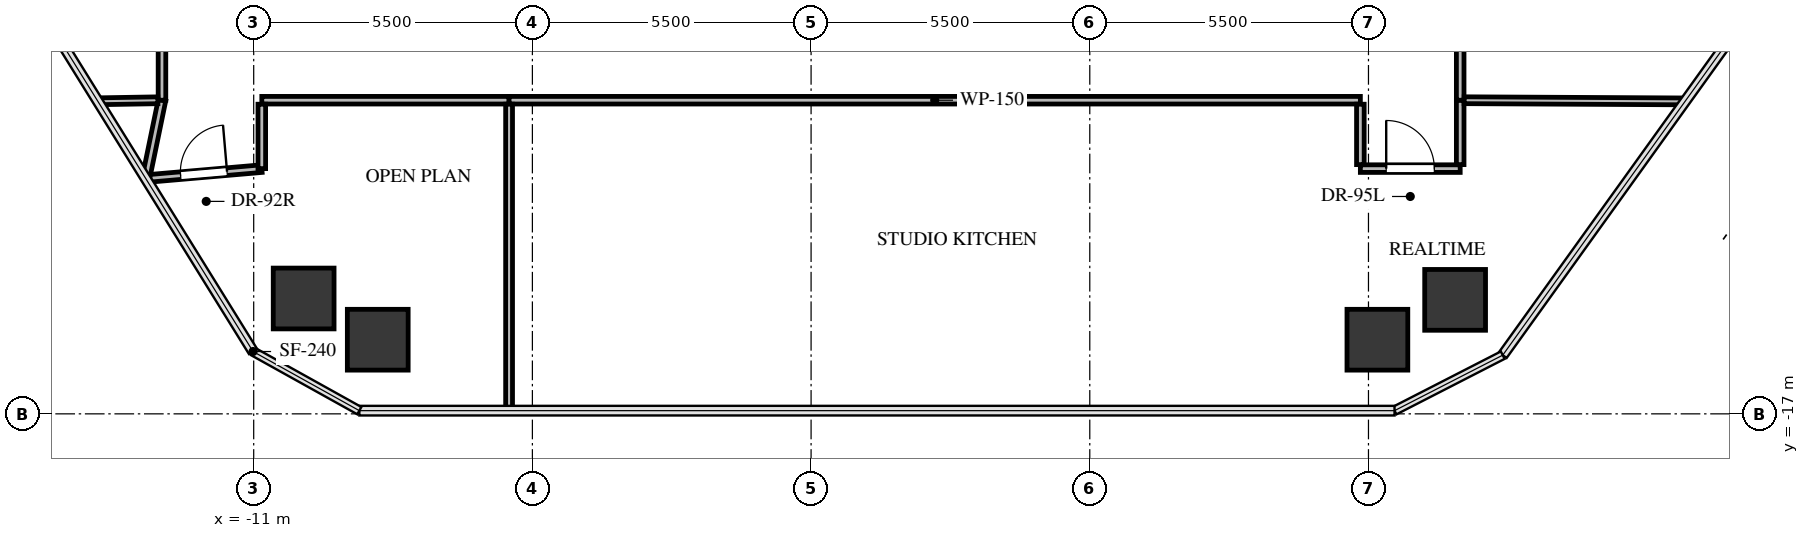
"""IFC4 building model, lengths in metres.
Left out: names, types, materials, properties, quantities, classifications, styles, units other than length and angle.
Written with IfcOpenShell. Run it as: python <this file> out.ifc"""

import sys

from ifc_helpers import new_model, si_unit, direction, frame, frame_2d, origin, origin_2d, place, context, subcontext, project, spatial, rectangle, extrude, source, transform, mapped, element, fill, save


model = new_model("IFC4")
c1 = context("Model", 3, precision=1e-05, world=origin(), true_north=direction((0.0, 1.0)))
c2 = subcontext(c1, "Body", "Model", "MODEL_VIEW")
j1 = project(units=[si_unit("LENGTHUNIT", "METRE"), si_unit("PLANEANGLEUNIT", "RADIAN")], contexts=[c1])
p1 = place(None, origin())
s1 = spatial("IfcSite", under=j1, at=p1, CompositionType="ELEMENT")
p2 = place(p1, origin())
s2 = spatial("IfcBuilding", under=s1, at=p2, CompositionType="ELEMENT")
p3 = place(p2, frame((0.0, 0.0, 133.8)))
s3 = spatial("IfcBuildingStorey", under=s2, at=p3, CompositionType="ELEMENT", Elevation=133.8)
m1 = source(origin(), c2, "Body", "SweptSolid", [
    extrude(rectangle(XDim=1.2, YDim=1.2, at=origin_2d()), origin(), (0.0, 0.0, 1.0), 3.3),
])
for number, where, z_axis, x_axis in (
    (1, (-10.014, -14.723, -0.24), (0.0, 0.0, 1.0), (1.0, 0.0, 0.0)),
    (2, (12.71, -14.75, -0.24), (0.0, 0.0, 1.0), (1.0, 0.0, 0.0)),
    (3, (11.176, -15.537, -0.24), (0.0, 0.0, 1.0), (1.0, 0.0, 0.0)),
    (4, (-8.552, -15.537, -0.24), (0.0, 0.0, 1.0), (1.0, 0.0, 0.0)),
):
    element("IfcColumn", number, at=place(p3, frame(where, z_axis=z_axis, x_axis=x_axis)), inside=s3, PredefinedType="COLUMN", context=c2, shape_type="MappedRepresentation", body=[
        mapped(m1, transform((0.0, 0.0, 0.0), x_axis=(1.0, 0.0, 0.0), y_axis=(0.0, 1.0, 0.0), z_axis=(0.0, 0.0, 1.0), scale=1.0)),
    ])
p4 = place(p3, frame((-10.84, -10.81, 0.0), z_axis=(0.0, 0.0, 1.0), x_axis=(1.0, 0.0, 0.0)))
e5 = element("IfcWall", 5, at=p4, inside=s3, PredefinedType="PARTITIONING", context=c2, shape_type="SweptSolid", body=[
    extrude(rectangle(XDim=4.88, YDim=0.15, at=frame_2d((2.44, 0.0))), origin(), (0.0, 0.0, 1.0), 2.212),
])
p5 = place(p3, frame((-13.129, -12.358, 0.0), z_axis=(0.0, 0.0, 1.0), x_axis=(0.996279168698, 0.086184789953, 0.0)))
e6 = element("IfcWall", 6, at=p5, inside=s3, PredefinedType="PARTITIONING", context=c2, shape_type="SweptSolid", body=[
    extrude(rectangle(XDim=2.297, YDim=0.15, at=frame_2d((1.149, 0.0))), origin(), (0.0, 0.0, 1.0), 2.38),
])
p6 = place(p5, frame((0.689, 0.0, 0.0)))
e7 = element("IfcOpeningElement", 7, at=p6, cuts=e6, PredefinedType="OPENING", context=c2, shape_type="SweptSolid", body=[
    extrude(rectangle(XDim=0.92, YDim=2.1, at=frame_2d((0.46, 1.05))), frame((0.0, 0.085, 0.0), z_axis=(0.0, -1.0, 0.0), x_axis=(1.0, 0.0, 0.0)), (0.0, 0.0, 1.0), 0.17),
])
p7 = place(p3, frame((-12.81, -10.81, 0.0), z_axis=(0.0, 0.0, 1.0), x_axis=(-0.201786289638, -0.979429575474, 0.0)))
e8 = element("IfcWall", 8, at=p7, inside=s3, PredefinedType="PARTITIONING", context=c2, shape_type="SweptSolid", body=[
    extrude(rectangle(XDim=1.498, YDim=0.15, at=frame_2d((0.749, 0.0))), origin(), (0.0, 0.0, 1.0), 3.045),
])
p8 = place(p3, frame((-10.84, -12.16, 0.0), z_axis=(0.0, 0.0, 1.0), x_axis=(0.0, 1.0, 0.0)))
e9 = element("IfcWall", 9, at=p8, inside=s3, PredefinedType="PARTITIONING", context=c2, shape_type="SweptSolid", body=[
    extrude(rectangle(XDim=1.271, YDim=0.15, at=frame_2d((0.635, 0.0))), origin(), (0.0, 0.0, 1.0), 3.045),
])
p9 = place(p3, frame((-5.96, -10.81, 0.0), z_axis=(0.0, 0.0, 1.0), x_axis=(1.0, 0.0, 0.0)))
e10 = element("IfcWall", 10, at=p9, inside=s3, PredefinedType="PARTITIONING", context=c2, shape_type="SweptSolid", body=[
    extrude(rectangle(XDim=16.8, YDim=0.15, at=frame_2d((8.4, 0.0))), origin(), (0.0, 0.0, 1.0), 2.212),
])
p10 = place(p3, frame((10.84, -12.16, 0.0), z_axis=(0.0, 0.0, 1.0), x_axis=(1.0, 0.0, 0.0)))
e11 = element("IfcWall", 11, at=p10, inside=s3, PredefinedType="PARTITIONING", context=c2, shape_type="SweptSolid", body=[
    extrude(rectangle(XDim=1.97, YDim=0.15, at=frame_2d((0.985, 0.0))), origin(), (0.0, 0.0, 1.0), 3.045),
])
p11 = place(p10, frame((0.51, 0.0, 0.0)))
e12 = element("IfcOpeningElement", 12, at=p11, cuts=e11, PredefinedType="OPENING", context=c2, shape_type="SweptSolid", body=[
    extrude(rectangle(XDim=0.95, YDim=2.1, at=frame_2d((0.475, 1.05))), frame((0.0, 0.085, 0.0), z_axis=(0.0, -1.0, 0.0), x_axis=(1.0, 0.0, 0.0)), (0.0, 0.0, 1.0), 0.17),
])
p12 = place(p3, frame((10.84, -10.889, 0.0), z_axis=(0.0, 0.0, 1.0), x_axis=(0.0, -1.0, 0.0)))
e13 = element("IfcWall", 13, at=p12, inside=s3, PredefinedType="PARTITIONING", context=c2, shape_type="SweptSolid", body=[
    extrude(rectangle(XDim=1.192, YDim=0.15, at=frame_2d((0.596, 0.0))), origin(), (0.0, 0.0, 1.0), 3.045),
])
p13 = place(p3, frame((12.81, -12.081, 0.0), z_axis=(0.0, 0.0, 1.0), x_axis=(0.0, 1.0, 0.0)))
e14 = element("IfcWall", 14, at=p13, inside=s3, PredefinedType="PARTITIONING", context=c2, shape_type="SweptSolid", body=[
    extrude(rectangle(XDim=1.271, YDim=0.15, at=frame_2d((0.635, 0.0))), origin(), (0.0, 0.0, 1.0), 3.045),
])
p14 = place(p3, frame((-12.81, -3.46, 0.0), z_axis=(0.0, 0.0, 1.0), x_axis=(0.0, -1.0, 0.0)))
e15 = element("IfcWall", 15, at=p14, inside=s3, PredefinedType="PARTITIONING", context=c2, shape_type="SweptSolid", body=[
    extrude(rectangle(XDim=7.35, YDim=0.15, at=frame_2d((3.675, 0.0))), origin(), (0.0, 0.0, 1.0), 2.38),
])
p15 = place(p14, frame((3.225, 0.0, 0.0)))
e16 = element("IfcOpeningElement", 16, at=p15, cuts=e15, PredefinedType="OPENING", context=c2, shape_type="SweptSolid", body=[
    extrude(rectangle(XDim=0.9, YDim=2.05, at=frame_2d((0.45, 1.025))), frame((0.0, 0.085, 0.0), z_axis=(0.0, -1.0, 0.0), x_axis=(1.0, 0.0, 0.0)), (0.0, 0.0, 1.0), 0.17),
])
p16 = place(p3, frame((12.81, -10.81, 0.0), z_axis=(0.0, 0.0, 1.0), x_axis=(0.0, 1.0, 0.0)))
e17 = element("IfcWall", 17, at=p16, inside=s3, PredefinedType="PARTITIONING", context=c2, shape_type="SweptSolid", body=[
    extrude(rectangle(XDim=2.37, YDim=0.15, at=frame_2d((1.185, 0.0))), origin(), (0.0, 0.0, 1.0), 3.045),
])
p17 = place(p3, frame((-5.96, -10.889, 0.0), z_axis=(0.0, 0.0, 1.0), x_axis=(0.0, -1.0, 0.0)))
e18 = element("IfcWall", 18, at=p17, inside=s3, PredefinedType="PARTITIONING", context=c2, shape_type="SweptSolid", body=[
    extrude(rectangle(XDim=6.048, YDim=0.135, at=frame_2d((3.024, 0.0))), origin(), (0.0, 0.0, 1.0), 2.212),
])
p18 = place(p3, frame((-14.076, -10.831, 0.0), z_axis=(0.0, 0.0, 1.0), x_axis=(0.999860796611, 0.016684945308, 0.0)))
e19 = element("IfcWall", 19, at=p18, inside=s3, PredefinedType="PARTITIONING", context=c2, shape_type="SweptSolid", body=[
    extrude(rectangle(XDim=1.185, YDim=0.135, at=frame_2d((0.593, 0.0))), origin(), (0.0, 0.0, 1.0), 3.045),
])
p19 = place(p3, frame((12.889, -10.81, 0.0), z_axis=(0.0, 0.0, 1.0), x_axis=(0.999986140562, -0.005264853658, 0.0)))
e20 = element("IfcWall", 20, at=p19, inside=s3, PredefinedType="PARTITIONING", context=c2, shape_type="SweptSolid", body=[
    extrude(rectangle(XDim=4.359, YDim=0.135, at=frame_2d((2.179, 0.0))), origin(), (0.0, 0.0, 1.0), 2.38),
])
m2 = source(origin(), c2, "Body", "SweptSolid", [
    extrude(rectangle(XDim=0.92, YDim=2.1, at=frame_2d((0.46, 1.05))), frame((0.0, 0.025, 0.0), z_axis=(0.0, -1.0, 0.0), x_axis=(1.0, 0.0, 0.0)), (0.0, 0.0, 1.0), 0.05),
])
p20 = place(p6, origin())
e21 = element("IfcDoor", 21, at=p20, inside=s3, OperationType="SINGLE_SWING_RIGHT", PredefinedType="DOOR", context=c2, shape_type="MappedRepresentation", body=[
    mapped(m2, transform((0.0, 0.0, 0.0), x_axis=(1.0, 0.0, 0.0), y_axis=(0.0, 1.0, 0.0), z_axis=(0.0, 0.0, 1.0), scale=1.0)),
])
fill(e7, e21)
m3 = source(origin(), c2, "Body", "SweptSolid", [
    extrude(rectangle(XDim=0.95, YDim=2.1, at=frame_2d((0.475, 1.05))), frame((0.0, 0.025, 0.0), z_axis=(0.0, -1.0, 0.0), x_axis=(1.0, 0.0, 0.0)), (0.0, 0.0, 1.0), 0.05),
])
p21 = place(p11, origin())
e22 = element("IfcDoor", 22, at=p21, inside=s3, OperationType="SINGLE_SWING_LEFT", PredefinedType="DOOR", context=c2, shape_type="MappedRepresentation", body=[
    mapped(m3, transform((0.0, 0.0, 0.0), x_axis=(1.0, 0.0, 0.0), y_axis=(0.0, 1.0, 0.0), z_axis=(0.0, 0.0, 1.0), scale=1.0)),
])
fill(e12, e22)
save(model, sys.argv[1])
